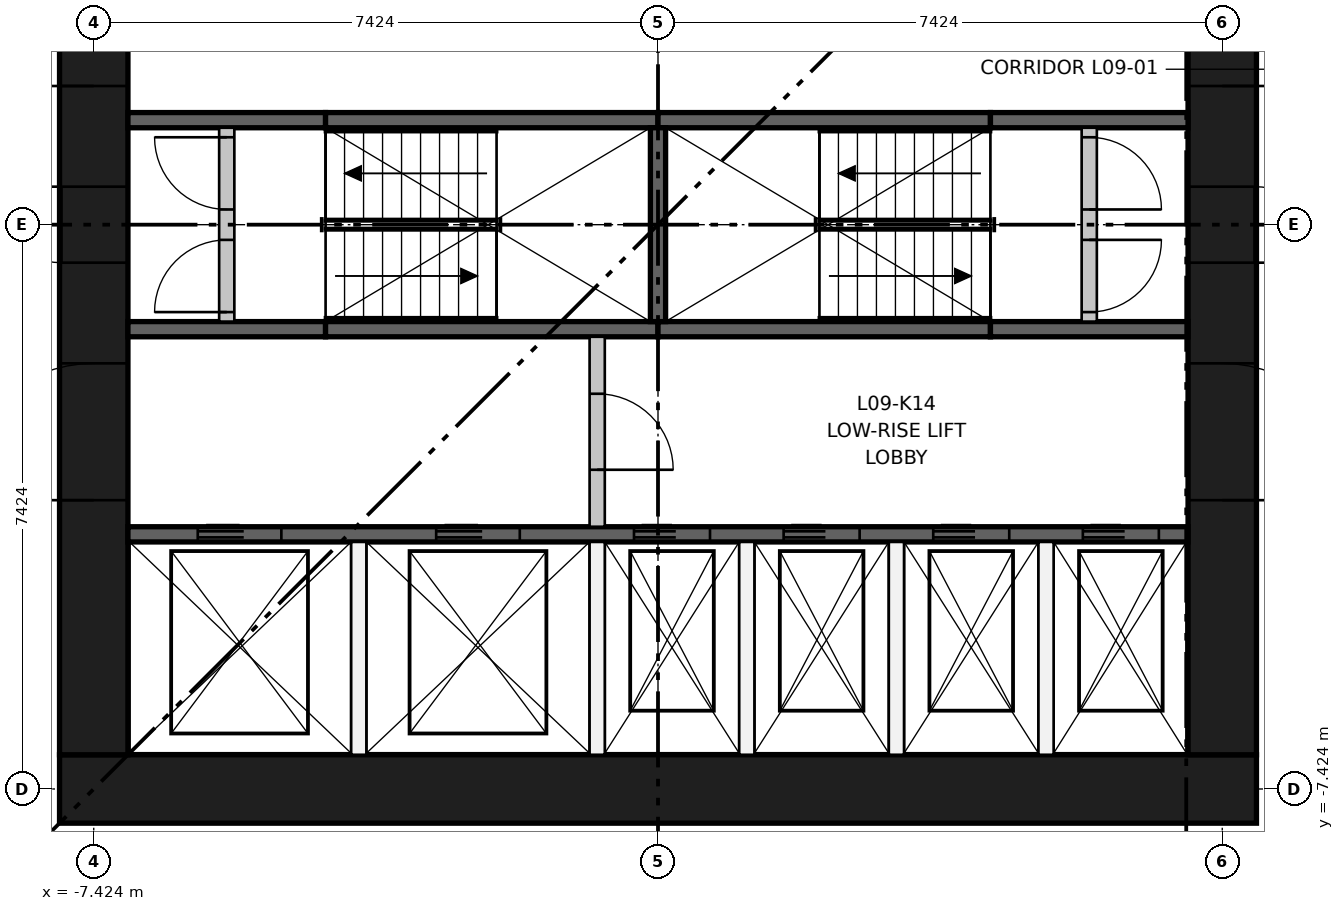
"""IFC4 building model, lengths in metres.
Left out: names, types, materials, properties, quantities, classifications, styles, units other than length and angle.
Written with IfcOpenShell. Run it as: python <this file> out.ifc"""

import sys

from ifc_helpers import new_model, si_unit, direction, frame, frame_2d, origin, place, context, subcontext, project, spatial, rectangle, extrude, element, fill, save


model = new_model("IFC4")
c1 = context("Model", 3, precision=1e-05, world=origin(), true_north=direction((0.0, 1.0)))
c2 = subcontext(c1, "Body", "Model", "MODEL_VIEW")
j1 = project(units=[si_unit("LENGTHUNIT", "METRE"), si_unit("PLANEANGLEUNIT", "RADIAN")], contexts=[c1])
p1 = place(None, origin())
s1 = spatial("IfcSite", under=j1, at=p1, CompositionType="ELEMENT")
p2 = place(p1, origin())
s2 = spatial("IfcBuilding", under=s1, at=p2, CompositionType="ELEMENT")
p3 = place(p2, frame((0.0, 0.0, 37.15)))
s3 = spatial("IfcBuildingStorey", under=s2, at=p3, CompositionType="ELEMENT", Elevation=37.15)
p4 = place(p3, frame((-7.874, -7.424, 0.0), z_axis=(0.0, 0.0, 1.0), x_axis=(1.0, 0.0, 0.0)))
e1 = element("IfcWall", 1, at=p4, inside=s3, PredefinedType="SHEAR", context=c2, shape_type="SweptSolid", body=[
    extrude(rectangle(XDim=15.748, YDim=0.9, at=frame_2d((7.874, 0.0))), origin(), (0.0, 0.0, 1.0), 3.65),
])
p5 = place(p3, frame((-7.424, -6.974, 0.0), z_axis=(0.0, 0.0, 1.0), x_axis=(0.0, 1.0, 0.0)))
e2 = element("IfcWall", 2, at=p5, inside=s3, PredefinedType="SHEAR", context=c2, shape_type="SweptSolid", body=[
    extrude(rectangle(XDim=13.948, YDim=0.9, at=frame_2d((6.974, 0.0))), origin(), (0.0, 0.0, 1.0), 3.65),
])
p6 = place(p5, frame((6.474, 0.0, 0.0)))
e3 = element("IfcOpeningElement", 3, at=p6, cuts=e2, PredefinedType="OPENING", context=c2, shape_type="SweptSolid", body=[
    extrude(rectangle(XDim=1.0, YDim=2.1, at=frame_2d((0.5, 1.05))), frame((0.0, 0.46, 0.0), z_axis=(0.0, -1.0, 0.0), x_axis=(1.0, 0.0, 0.0)), (0.0, 0.0, 1.0), 0.92),
])
p7 = place(p5, frame((3.35, 0.0, 0.0)))
e4 = element("IfcOpeningElement", 4, at=p7, cuts=e2, PredefinedType="OPENING", context=c2, shape_type="SweptSolid", body=[
    extrude(rectangle(XDim=1.8, YDim=2.1, at=frame_2d((0.9, 1.05))), frame((0.0, 0.46, 0.0), z_axis=(0.0, -1.0, 0.0), x_axis=(1.0, 0.0, 0.0)), (0.0, 0.0, 1.0), 0.92),
])
p8 = place(p5, frame((8.799, 0.0, 0.0)))
e5 = element("IfcOpeningElement", 5, at=p8, cuts=e2, PredefinedType="OPENING", context=c2, shape_type="SweptSolid", body=[
    extrude(rectangle(XDim=1.8, YDim=2.1, at=frame_2d((0.9, 1.05))), frame((0.0, 0.46, 0.0), z_axis=(0.0, -1.0, 0.0), x_axis=(1.0, 0.0, 0.0)), (0.0, 0.0, 1.0), 0.92),
])
p9 = place(p5, frame((11.974, 0.0, 0.0)))
e6 = element("IfcOpeningElement", 6, at=p9, cuts=e2, PredefinedType="OPENING", context=c2, shape_type="SweptSolid", body=[
    extrude(rectangle(XDim=1.0, YDim=2.1, at=frame_2d((0.5, 1.05))), frame((0.0, 0.46, 0.0), z_axis=(0.0, -1.0, 0.0), x_axis=(1.0, 0.0, 0.0)), (0.0, 0.0, 1.0), 0.92),
])
p10 = place(p3, frame((7.424, -6.974, 0.0), z_axis=(0.0, 0.0, 1.0), x_axis=(0.0, 1.0, 0.0)))
e7 = element("IfcWall", 7, at=p10, inside=s3, PredefinedType="SHEAR", context=c2, shape_type="SweptSolid", body=[
    extrude(rectangle(XDim=13.948, YDim=0.9, at=frame_2d((6.974, 0.0))), origin(), (0.0, 0.0, 1.0), 3.65),
])
p11 = place(p10, frame((6.474, 0.0, 0.0)))
e8 = element("IfcOpeningElement", 8, at=p11, cuts=e7, PredefinedType="OPENING", context=c2, shape_type="SweptSolid", body=[
    extrude(rectangle(XDim=1.0, YDim=2.1, at=frame_2d((0.5, 1.05))), frame((0.0, 0.46, 0.0), z_axis=(0.0, -1.0, 0.0), x_axis=(1.0, 0.0, 0.0)), (0.0, 0.0, 1.0), 0.92),
])
p12 = place(p10, frame((3.35, 0.0, 0.0)))
e9 = element("IfcOpeningElement", 9, at=p12, cuts=e7, PredefinedType="OPENING", context=c2, shape_type="SweptSolid", body=[
    extrude(rectangle(XDim=1.8, YDim=2.1, at=frame_2d((0.9, 1.05))), frame((0.0, 0.46, 0.0), z_axis=(0.0, -1.0, 0.0), x_axis=(1.0, 0.0, 0.0)), (0.0, 0.0, 1.0), 0.92),
])
p13 = place(p10, frame((8.799, 0.0, 0.0)))
e10 = element("IfcOpeningElement", 10, at=p13, cuts=e7, PredefinedType="OPENING", context=c2, shape_type="SweptSolid", body=[
    extrude(rectangle(XDim=1.8, YDim=2.1, at=frame_2d((0.9, 1.05))), frame((0.0, 0.46, 0.0), z_axis=(0.0, -1.0, 0.0), x_axis=(1.0, 0.0, 0.0)), (0.0, 0.0, 1.0), 0.92),
])
p14 = place(p3, frame((-6.974, -4.074, 0.0), z_axis=(0.0, 0.0, 1.0), x_axis=(1.0, 0.0, 0.0)))
e11 = element("IfcWall", 11, at=p14, inside=s3, PredefinedType="SHEAR", context=c2, shape_type="SweptSolid", body=[
    extrude(rectangle(XDim=13.948, YDim=0.2, at=frame_2d((6.974, 0.0))), origin(), (0.0, 0.0, 1.0), 3.3),
])
p15 = place(p14, frame((0.918, 0.0, 0.0)))
e12 = element("IfcOpeningElement", 12, at=p15, cuts=e11, PredefinedType="OPENING", context=c2, shape_type="SweptSolid", body=[
    extrude(rectangle(XDim=1.1, YDim=2.1, at=frame_2d((0.55, 1.05))), frame((0.0, 0.11, 0.0), z_axis=(0.0, -1.0, 0.0), x_axis=(1.0, 0.0, 0.0)), (0.0, 0.0, 1.0), 0.22),
])
p16 = place(p14, frame((4.055, 0.0, 0.0)))
e13 = element("IfcOpeningElement", 13, at=p16, cuts=e11, PredefinedType="OPENING", context=c2, shape_type="SweptSolid", body=[
    extrude(rectangle(XDim=1.1, YDim=2.1, at=frame_2d((0.55, 1.05))), frame((0.0, 0.11, 0.0), z_axis=(0.0, -1.0, 0.0), x_axis=(1.0, 0.0, 0.0)), (0.0, 0.0, 1.0), 0.22),
])
p17 = place(p14, frame((6.658, 0.0, 0.0)))
e14 = element("IfcOpeningElement", 14, at=p17, cuts=e11, PredefinedType="OPENING", context=c2, shape_type="SweptSolid", body=[
    extrude(rectangle(XDim=1.0, YDim=2.1, at=frame_2d((0.5, 1.05))), frame((0.0, 0.11, 0.0), z_axis=(0.0, -1.0, 0.0), x_axis=(1.0, 0.0, 0.0)), (0.0, 0.0, 1.0), 0.22),
])
p18 = place(p14, frame((8.627, 0.0, 0.0)))
e15 = element("IfcOpeningElement", 15, at=p18, cuts=e11, PredefinedType="OPENING", context=c2, shape_type="SweptSolid", body=[
    extrude(rectangle(XDim=1.0, YDim=2.1, at=frame_2d((0.5, 1.05))), frame((0.0, 0.11, 0.0), z_axis=(0.0, -1.0, 0.0), x_axis=(1.0, 0.0, 0.0)), (0.0, 0.0, 1.0), 0.22),
])
p19 = place(p14, frame((10.595, 0.0, 0.0)))
e16 = element("IfcOpeningElement", 16, at=p19, cuts=e11, PredefinedType="OPENING", context=c2, shape_type="SweptSolid", body=[
    extrude(rectangle(XDim=1.0, YDim=2.1, at=frame_2d((0.5, 1.05))), frame((0.0, 0.11, 0.0), z_axis=(0.0, -1.0, 0.0), x_axis=(1.0, 0.0, 0.0)), (0.0, 0.0, 1.0), 0.22),
])
p20 = place(p14, frame((12.564, 0.0, 0.0)))
e17 = element("IfcOpeningElement", 17, at=p20, cuts=e11, PredefinedType="OPENING", context=c2, shape_type="SweptSolid", body=[
    extrude(rectangle(XDim=1.0, YDim=2.1, at=frame_2d((0.5, 1.05))), frame((0.0, 0.11, 0.0), z_axis=(0.0, -1.0, 0.0), x_axis=(1.0, 0.0, 0.0)), (0.0, 0.0, 1.0), 0.22),
])
p21 = place(p3, frame((-6.974, -1.375, 0.0), z_axis=(0.0, 0.0, 1.0), x_axis=(1.0, 0.0, 0.0)))
e18 = element("IfcWall", 18, at=p21, inside=s3, PredefinedType="SHEAR", context=c2, shape_type="SweptSolid", body=[
    extrude(rectangle(XDim=2.6, YDim=0.2, at=frame_2d((1.3, 0.0))), origin(), (0.0, 0.0, 1.0), 3.3),
])
for number, where, z_axis, x_axis in (
    (19, (-4.374, -1.375, 0.0), (0.0, 0.0, 1.0), (1.0, 0.0, 0.0)),
    (20, (0.0, -1.375, 0.0), (0.0, 0.0, 1.0), (1.0, 0.0, 0.0)),
):
    element("IfcWall", number, at=place(p3, frame(where, z_axis=z_axis, x_axis=x_axis)), inside=s3, PredefinedType="SHEAR", context=c2, shape_type="SweptSolid", body=[
        extrude(rectangle(XDim=4.374, YDim=0.2, at=frame_2d((2.187, 0.0))), origin(), (0.0, 0.0, 1.0), 3.3),
    ])
for number, where, z_axis, x_axis in (
    (21, (4.374, -1.375, 0.0), (0.0, 0.0, 1.0), (1.0, 0.0, 0.0)),
    (22, (-6.974, 1.375, 0.0), (0.0, 0.0, 1.0), (1.0, 0.0, 0.0)),
):
    element("IfcWall", number, at=place(p3, frame(where, z_axis=z_axis, x_axis=x_axis)), inside=s3, PredefinedType="SHEAR", context=c2, shape_type="SweptSolid", body=[
        extrude(rectangle(XDim=2.6, YDim=0.2, at=frame_2d((1.3, 0.0))), origin(), (0.0, 0.0, 1.0), 3.3),
    ])
for number, where, z_axis, x_axis in (
    (23, (-4.374, 1.375, 0.0), (0.0, 0.0, 1.0), (1.0, 0.0, 0.0)),
    (24, (0.0, 1.375, 0.0), (0.0, 0.0, 1.0), (1.0, 0.0, 0.0)),
):
    element("IfcWall", number, at=place(p3, frame(where, z_axis=z_axis, x_axis=x_axis)), inside=s3, PredefinedType="SHEAR", context=c2, shape_type="SweptSolid", body=[
        extrude(rectangle(XDim=4.374, YDim=0.2, at=frame_2d((2.187, 0.0))), origin(), (0.0, 0.0, 1.0), 3.3),
    ])
p22 = place(p3, frame((4.374, 1.375, 0.0), z_axis=(0.0, 0.0, 1.0), x_axis=(1.0, 0.0, 0.0)))
e25 = element("IfcWall", 25, at=p22, inside=s3, PredefinedType="SHEAR", context=c2, shape_type="SweptSolid", body=[
    extrude(rectangle(XDim=2.6, YDim=0.2, at=frame_2d((1.3, 0.0))), origin(), (0.0, 0.0, 1.0), 3.3),
])
p23 = place(p3, frame((0.0, -1.275, 0.0), z_axis=(0.0, 0.0, 1.0), x_axis=(0.0, 1.0, 0.0)))
e26 = element("IfcWall", 26, at=p23, inside=s3, PredefinedType="SHEAR", context=c2, shape_type="SweptSolid", body=[
    extrude(rectangle(XDim=2.55, YDim=0.2, at=frame_2d((1.275, 0.0))), origin(), (0.0, 0.0, 1.0), 3.3),
])
for number, where, z_axis, x_axis in (
    (27, (-3.937, -6.974, 0.0), (0.0, 0.0, 1.0), (0.0, 1.0, 0.0)),
    (28, (-0.8, -6.974, 0.0), (0.0, 0.0, 1.0), (0.0, 1.0, 0.0)),
):
    element("IfcWall", number, at=place(p3, frame(where, z_axis=z_axis, x_axis=x_axis)), inside=s3, PredefinedType="PARTITIONING", context=c2, shape_type="SweptSolid", body=[
        extrude(rectangle(XDim=2.8, YDim=0.2, at=frame_2d((1.4, 0.0))), origin(), (0.0, 0.0, 1.0), 3.3),
    ])
p24 = place(p3, frame((-0.8, -3.974, 0.0), z_axis=(0.0, 0.0, 1.0), x_axis=(0.0, 1.0, 0.0)))
e29 = element("IfcWall", 29, at=p24, inside=s3, PredefinedType="PARTITIONING", context=c2, shape_type="SweptSolid", body=[
    extrude(rectangle(XDim=2.499, YDim=0.2, at=frame_2d((1.25, 0.0))), origin(), (0.0, 0.0, 1.0), 3.3),
])
p25 = place(p24, frame((0.75, 0.0, 0.0)))
e30 = element("IfcOpeningElement", 30, at=p25, cuts=e29, PredefinedType="OPENING", context=c2, shape_type="SweptSolid", body=[
    extrude(rectangle(XDim=1.0, YDim=2.1, at=frame_2d((0.5, 1.05))), frame((0.0, 0.11, 0.0), z_axis=(0.0, -1.0, 0.0), x_axis=(1.0, 0.0, 0.0)), (0.0, 0.0, 1.0), 0.22),
])
for number, where, z_axis, x_axis in (
    (31, (1.168, -6.974, 0.0), (0.0, 0.0, 1.0), (0.0, 1.0, 0.0)),
    (32, (3.137, -6.974, 0.0), (0.0, 0.0, 1.0), (0.0, 1.0, 0.0)),
    (33, (5.105, -6.974, 0.0), (0.0, 0.0, 1.0), (0.0, 1.0, 0.0)),
):
    element("IfcWall", number, at=place(p3, frame(where, z_axis=z_axis, x_axis=x_axis)), inside=s3, PredefinedType="PARTITIONING", context=c2, shape_type="SweptSolid", body=[
        extrude(rectangle(XDim=2.8, YDim=0.2, at=frame_2d((1.4, 0.0))), origin(), (0.0, 0.0, 1.0), 3.3),
    ])
p26 = place(p3, frame((-5.674, -1.275, 0.0), z_axis=(0.0, 0.0, 1.0), x_axis=(0.0, 1.0, 0.0)))
e34 = element("IfcWall", 34, at=p26, inside=s3, PredefinedType="PARTITIONING", context=c2, shape_type="SweptSolid", body=[
    extrude(rectangle(XDim=2.55, YDim=0.2, at=frame_2d((1.275, 0.0))), origin(), (0.0, 0.0, 1.0), 3.3),
])
p27 = place(p26, frame((0.125, 0.0, 0.0)))
e35 = element("IfcOpeningElement", 35, at=p27, cuts=e34, PredefinedType="OPENING", context=c2, shape_type="SweptSolid", body=[
    extrude(rectangle(XDim=0.95, YDim=2.1, at=frame_2d((0.475, 1.05))), frame((0.0, 0.11, 0.0), z_axis=(0.0, -1.0, 0.0), x_axis=(1.0, 0.0, 0.0)), (0.0, 0.0, 1.0), 0.22),
])
p28 = place(p26, frame((1.475, 0.0, 0.0)))
e36 = element("IfcOpeningElement", 36, at=p28, cuts=e34, PredefinedType="OPENING", context=c2, shape_type="SweptSolid", body=[
    extrude(rectangle(XDim=0.95, YDim=2.1, at=frame_2d((0.475, 1.05))), frame((0.0, 0.11, 0.0), z_axis=(0.0, -1.0, 0.0), x_axis=(1.0, 0.0, 0.0)), (0.0, 0.0, 1.0), 0.22),
])
p29 = place(p3, frame((5.674, -1.275, 0.0), z_axis=(0.0, 0.0, 1.0), x_axis=(0.0, 1.0, 0.0)))
e37 = element("IfcWall", 37, at=p29, inside=s3, PredefinedType="PARTITIONING", context=c2, shape_type="SweptSolid", body=[
    extrude(rectangle(XDim=2.55, YDim=0.2, at=frame_2d((1.275, 0.0))), origin(), (0.0, 0.0, 1.0), 3.3),
])
p30 = place(p29, frame((0.125, 0.0, 0.0)))
e38 = element("IfcOpeningElement", 38, at=p30, cuts=e37, PredefinedType="OPENING", context=c2, shape_type="SweptSolid", body=[
    extrude(rectangle(XDim=0.95, YDim=2.1, at=frame_2d((0.475, 1.05))), frame((0.0, 0.11, 0.0), z_axis=(0.0, -1.0, 0.0), x_axis=(1.0, 0.0, 0.0)), (0.0, 0.0, 1.0), 0.22),
])
p31 = place(p29, frame((1.475, 0.0, 0.0)))
e39 = element("IfcOpeningElement", 39, at=p31, cuts=e37, PredefinedType="OPENING", context=c2, shape_type="SweptSolid", body=[
    extrude(rectangle(XDim=0.95, YDim=2.1, at=frame_2d((0.475, 1.05))), frame((0.0, 0.11, 0.0), z_axis=(0.0, -1.0, 0.0), x_axis=(1.0, 0.0, 0.0)), (0.0, 0.0, 1.0), 0.22),
])
p32 = place(p15, origin())
e40 = element("IfcDoor", 40, at=p32, inside=s3, OperationType="DOUBLE_DOOR_SLIDING", PredefinedType="DOOR", context=c2, shape_type="SweptSolid", body=[
    extrude(rectangle(XDim=1.1, YDim=2.1, at=frame_2d((0.55, 1.05))), frame((0.0, 0.025, 0.0), z_axis=(0.0, -1.0, 0.0), x_axis=(1.0, 0.0, 0.0)), (0.0, 0.0, 1.0), 0.05),
])
fill(e12, e40)
p33 = place(p16, origin())
e41 = element("IfcDoor", 41, at=p33, inside=s3, OperationType="DOUBLE_DOOR_SLIDING", PredefinedType="DOOR", context=c2, shape_type="SweptSolid", body=[
    extrude(rectangle(XDim=1.1, YDim=2.1, at=frame_2d((0.55, 1.05))), frame((0.0, 0.025, 0.0), z_axis=(0.0, -1.0, 0.0), x_axis=(1.0, 0.0, 0.0)), (0.0, 0.0, 1.0), 0.05),
])
fill(e13, e41)
p34 = place(p17, origin())
e42 = element("IfcDoor", 42, at=p34, inside=s3, OperationType="DOUBLE_DOOR_SLIDING", PredefinedType="DOOR", context=c2, shape_type="SweptSolid", body=[
    extrude(rectangle(XDim=1.0, YDim=2.1, at=frame_2d((0.5, 1.05))), frame((0.0, 0.025, 0.0), z_axis=(0.0, -1.0, 0.0), x_axis=(1.0, 0.0, 0.0)), (0.0, 0.0, 1.0), 0.05),
])
fill(e14, e42)
p35 = place(p18, origin())
e43 = element("IfcDoor", 43, at=p35, inside=s3, OperationType="DOUBLE_DOOR_SLIDING", PredefinedType="DOOR", context=c2, shape_type="SweptSolid", body=[
    extrude(rectangle(XDim=1.0, YDim=2.1, at=frame_2d((0.5, 1.05))), frame((0.0, 0.025, 0.0), z_axis=(0.0, -1.0, 0.0), x_axis=(1.0, 0.0, 0.0)), (0.0, 0.0, 1.0), 0.05),
])
fill(e15, e43)
p36 = place(p19, origin())
e44 = element("IfcDoor", 44, at=p36, inside=s3, OperationType="DOUBLE_DOOR_SLIDING", PredefinedType="DOOR", context=c2, shape_type="SweptSolid", body=[
    extrude(rectangle(XDim=1.0, YDim=2.1, at=frame_2d((0.5, 1.05))), frame((0.0, 0.025, 0.0), z_axis=(0.0, -1.0, 0.0), x_axis=(1.0, 0.0, 0.0)), (0.0, 0.0, 1.0), 0.05),
])
fill(e16, e44)
p37 = place(p20, origin())
e45 = element("IfcDoor", 45, at=p37, inside=s3, OperationType="DOUBLE_DOOR_SLIDING", PredefinedType="DOOR", context=c2, shape_type="SweptSolid", body=[
    extrude(rectangle(XDim=1.0, YDim=2.1, at=frame_2d((0.5, 1.05))), frame((0.0, 0.025, 0.0), z_axis=(0.0, -1.0, 0.0), x_axis=(1.0, 0.0, 0.0)), (0.0, 0.0, 1.0), 0.05),
])
fill(e17, e45)
p38 = place(p27, origin())
e46 = element("IfcDoor", 46, at=p38, inside=s3, OperationType="SINGLE_SWING_LEFT", PredefinedType="DOOR", context=c2, shape_type="SweptSolid", body=[
    extrude(rectangle(XDim=0.95, YDim=2.1, at=frame_2d((0.475, 1.05))), frame((0.0, 0.025, 0.0), z_axis=(0.0, -1.0, 0.0), x_axis=(1.0, 0.0, 0.0)), (0.0, 0.0, 1.0), 0.05),
])
fill(e35, e46)
p39 = place(p28, origin())
e47 = element("IfcDoor", 47, at=p39, inside=s3, OperationType="SINGLE_SWING_RIGHT", PredefinedType="DOOR", context=c2, shape_type="SweptSolid", body=[
    extrude(rectangle(XDim=0.95, YDim=2.1, at=frame_2d((0.475, 1.05))), frame((0.0, 0.025, 0.0), z_axis=(0.0, -1.0, 0.0), x_axis=(1.0, 0.0, 0.0)), (0.0, 0.0, 1.0), 0.05),
])
fill(e36, e47)
p40 = place(p30, frame((0.95, 0.0, 0.0), z_axis=(0.0, 0.0, 1.0), x_axis=(-1.0, 0.0, 0.0)))
e48 = element("IfcDoor", 48, at=p40, inside=s3, OperationType="SINGLE_SWING_RIGHT", PredefinedType="DOOR", context=c2, shape_type="SweptSolid", body=[
    extrude(rectangle(XDim=0.95, YDim=2.1, at=frame_2d((0.475, 1.05))), frame((0.0, 0.025, 0.0), z_axis=(0.0, -1.0, 0.0), x_axis=(1.0, 0.0, 0.0)), (0.0, 0.0, 1.0), 0.05),
])
fill(e38, e48)
p41 = place(p31, frame((0.95, 0.0, 0.0), z_axis=(0.0, 0.0, 1.0), x_axis=(-1.0, 0.0, 0.0)))
e49 = element("IfcDoor", 49, at=p41, inside=s3, OperationType="SINGLE_SWING_LEFT", PredefinedType="DOOR", context=c2, shape_type="SweptSolid", body=[
    extrude(rectangle(XDim=0.95, YDim=2.1, at=frame_2d((0.475, 1.05))), frame((0.0, 0.025, 0.0), z_axis=(0.0, -1.0, 0.0), x_axis=(1.0, 0.0, 0.0)), (0.0, 0.0, 1.0), 0.05),
])
fill(e39, e49)
p42 = place(p25, frame((1.0, 0.0, 0.0), z_axis=(0.0, 0.0, 1.0), x_axis=(-1.0, 0.0, 0.0)))
e50 = element("IfcDoor", 50, at=p42, inside=s3, OperationType="SINGLE_SWING_LEFT", PredefinedType="DOOR", context=c2, shape_type="SweptSolid", body=[
    extrude(rectangle(XDim=1.0, YDim=2.1, at=frame_2d((0.5, 1.05))), frame((0.0, 0.025, 0.0), z_axis=(0.0, -1.0, 0.0), x_axis=(1.0, 0.0, 0.0)), (0.0, 0.0, 1.0), 0.05),
])
fill(e30, e50)
p43 = place(p6, origin())
e51 = element("IfcDoor", 51, at=p43, inside=s3, OperationType="SINGLE_SWING_RIGHT", PredefinedType="DOOR", context=c2, shape_type="SweptSolid", body=[
    extrude(rectangle(XDim=1.0, YDim=2.1, at=frame_2d((0.5, 1.05))), frame((0.0, 0.45, 0.0), z_axis=(0.0, -1.0, 0.0), x_axis=(1.0, 0.0, 0.0)), (0.0, 0.0, 1.0), 0.05),
])
fill(e3, e51)
p44 = place(p7, origin())
e52 = element("IfcDoor", 52, at=p44, inside=s3, OperationType="DOUBLE_DOOR_SINGLE_SWING", PredefinedType="DOOR", context=c2, shape_type="SweptSolid", body=[
    extrude(rectangle(XDim=1.8, YDim=2.1, at=frame_2d((0.9, 1.05))), frame((0.0, 0.025, 0.0), z_axis=(0.0, -1.0, 0.0), x_axis=(1.0, 0.0, 0.0)), (0.0, 0.0, 1.0), 0.05),
])
fill(e4, e52)
p45 = place(p8, origin())
e53 = element("IfcDoor", 53, at=p45, inside=s3, OperationType="DOUBLE_DOOR_SINGLE_SWING", PredefinedType="DOOR", context=c2, shape_type="SweptSolid", body=[
    extrude(rectangle(XDim=1.8, YDim=2.1, at=frame_2d((0.9, 1.05))), frame((0.0, 0.025, 0.0), z_axis=(0.0, -1.0, 0.0), x_axis=(1.0, 0.0, 0.0)), (0.0, 0.0, 1.0), 0.05),
])
fill(e5, e53)
p46 = place(p11, frame((1.0, 0.0, 0.0), z_axis=(0.0, 0.0, 1.0), x_axis=(-1.0, 0.0, 0.0)))
e54 = element("IfcDoor", 54, at=p46, inside=s3, OperationType="SINGLE_SWING_LEFT", PredefinedType="DOOR", context=c2, shape_type="SweptSolid", body=[
    extrude(rectangle(XDim=1.0, YDim=2.1, at=frame_2d((0.5, 1.05))), frame((0.0, 0.45, 0.0), z_axis=(0.0, -1.0, 0.0), x_axis=(1.0, 0.0, 0.0)), (0.0, 0.0, 1.0), 0.05),
])
fill(e8, e54)
p47 = place(p12, frame((1.8, 0.0, 0.0), z_axis=(0.0, 0.0, 1.0), x_axis=(-1.0, 0.0, 0.0)))
e55 = element("IfcDoor", 55, at=p47, inside=s3, OperationType="DOUBLE_DOOR_SINGLE_SWING", PredefinedType="DOOR", context=c2, shape_type="SweptSolid", body=[
    extrude(rectangle(XDim=1.8, YDim=2.1, at=frame_2d((0.9, 1.05))), frame((0.0, 0.025, 0.0), z_axis=(0.0, -1.0, 0.0), x_axis=(1.0, 0.0, 0.0)), (0.0, 0.0, 1.0), 0.05),
])
fill(e9, e55)
p48 = place(p13, frame((1.8, 0.0, 0.0), z_axis=(0.0, 0.0, 1.0), x_axis=(-1.0, 0.0, 0.0)))
e56 = element("IfcDoor", 56, at=p48, inside=s3, OperationType="DOUBLE_DOOR_SINGLE_SWING", PredefinedType="DOOR", context=c2, shape_type="SweptSolid", body=[
    extrude(rectangle(XDim=1.8, YDim=2.1, at=frame_2d((0.9, 1.05))), frame((0.0, 0.025, 0.0), z_axis=(0.0, -1.0, 0.0), x_axis=(1.0, 0.0, 0.0)), (0.0, 0.0, 1.0), 0.05),
])
fill(e10, e56)
save(model, sys.argv[1])
